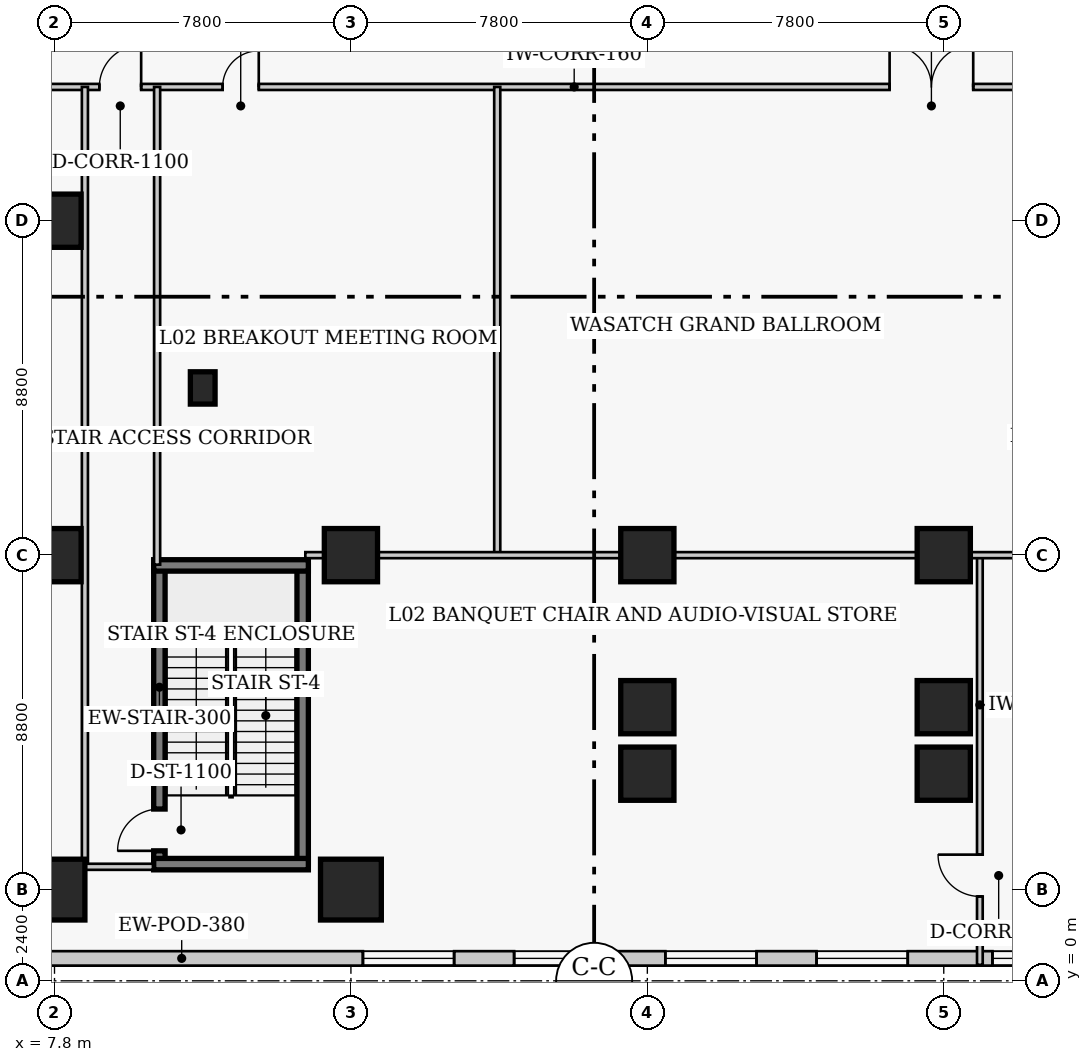
"""IFC4 building model, lengths in metres.
Left out: names, types, materials, properties, quantities, classifications, styles, units other than length and angle.
Written with IfcOpenShell. Run it as: python <this file> out.ifc"""

import sys

from ifc_helpers import new_model, si_unit, direction, frame, frame_2d, origin, origin_2d, place, context, subcontext, project, spatial, rectangle, extrude, element, fill, save


model = new_model("IFC4")
c1 = context("Model", 3, precision=1e-05, world=origin(), true_north=direction((0.0, 1.0)))
c2 = subcontext(c1, "Body", "Model", "MODEL_VIEW")
j1 = project(units=[si_unit("LENGTHUNIT", "METRE"), si_unit("PLANEANGLEUNIT", "RADIAN")], contexts=[c1])
p1 = place(None, origin())
s1 = spatial("IfcSite", under=j1, at=p1, CompositionType="ELEMENT")
p2 = place(p1, origin())
s2 = spatial("IfcBuilding", under=s1, at=p2, CompositionType="ELEMENT")
p3 = place(p2, frame((0.0, 0.0, 10.4)))
s3 = spatial("IfcBuildingStorey", under=s2, at=p3, CompositionType="ELEMENT", Elevation=10.4)
p4 = place(p3, frame((10.56, 3.07, 0.0), z_axis=(0.0, 0.0, 1.0), x_axis=(0.0, 1.0, 0.0)))
e1 = element("IfcWall", 1, at=p4, inside=s3, PredefinedType="SHEAR", context=c2, shape_type="SweptSolid", body=[
    extrude(rectangle(XDim=7.86, YDim=0.3, at=frame_2d((3.93, 0.0))), origin(), (0.0, 0.0, 1.0), 5.4),
])
p5 = place(p4, frame((0.35, 0.0, 0.0)))
e2 = element("IfcOpeningElement", 2, at=p5, cuts=e1, PredefinedType="OPENING", context=c2, shape_type="SweptSolid", body=[
    extrude(rectangle(XDim=1.1, YDim=2.15, at=frame_2d((0.55, 1.075))), frame((0.0, 0.16, 0.0), z_axis=(0.0, -1.0, 0.0), x_axis=(1.0, 0.0, 0.0)), (0.0, 0.0, 1.0), 0.32),
])
p6 = place(p3, frame((14.33, 3.07, 0.0), z_axis=(0.0, 0.0, 1.0), x_axis=(0.0, 1.0, 0.0)))
e3 = element("IfcWall", 3, at=p6, inside=s3, PredefinedType="SHEAR", context=c2, shape_type="SweptSolid", body=[
    extrude(rectangle(XDim=7.86, YDim=0.3, at=frame_2d((3.93, 0.0))), origin(), (0.0, 0.0, 1.0), 5.4),
])
for number, where, z_axis, x_axis in (
    (4, (10.41, 10.93, 0.0), (0.0, 0.0, 1.0), (1.0, 0.0, 0.0)),
    (5, (10.41, 3.07, 0.0), (0.0, 0.0, 1.0), (1.0, 0.0, 0.0)),
):
    element("IfcWall", number, at=place(p3, frame(where, z_axis=z_axis, x_axis=x_axis)), inside=s3, PredefinedType="SHEAR", context=c2, shape_type="SweptSolid", body=[
        extrude(rectangle(XDim=4.07, YDim=0.3, at=frame_2d((2.035, 0.0))), origin(), (0.0, 0.0, 1.0), 5.4),
    ])
p7 = place(p3, frame((7.8, 2.4, 0.0), z_axis=(0.0, 0.0, 1.0), x_axis=(1.0, 0.0, 0.0)))
e6 = element("IfcColumn", 6, at=p7, inside=s3, PredefinedType="COLUMN", context=c2, shape_type="SweptSolid", body=[
    extrude(rectangle(XDim=1.6, YDim=1.6, at=origin_2d()), origin(), (0.0, 0.0, 1.0), 5.4),
])
for number, where, z_axis, x_axis in (
    (7, (7.8, 11.2, 0.0), (0.0, 0.0, 1.0), (1.0, 0.0, 0.0)),
    (8, (7.8, 20.0, 0.0), (0.0, 0.0, 1.0), (1.0, 0.0, 0.0)),
):
    element("IfcColumn", number, at=place(p3, frame(where, z_axis=z_axis, x_axis=x_axis)), inside=s3, PredefinedType="COLUMN", context=c2, shape_type="SweptSolid", body=[
        extrude(rectangle(XDim=1.4, YDim=1.4, at=origin_2d()), origin(), (0.0, 0.0, 1.0), 5.4),
    ])
p8 = place(p3, frame((15.6, 2.4, 0.0), z_axis=(0.0, 0.0, 1.0), x_axis=(1.0, 0.0, 0.0)))
e9 = element("IfcColumn", 9, at=p8, inside=s3, PredefinedType="COLUMN", context=c2, shape_type="SweptSolid", body=[
    extrude(rectangle(XDim=1.6, YDim=1.6, at=origin_2d()), origin(), (0.0, 0.0, 1.0), 5.4),
])
for number, where, z_axis, x_axis in (
    (10, (15.6, 11.2, 0.0), (0.0, 0.0, 1.0), (1.0, 0.0, 0.0)),
    (11, (23.4, 11.2, 0.0), (0.0, 0.0, 1.0), (1.0, 0.0, 0.0)),
    (12, (31.2, 11.2, 0.0), (0.0, 0.0, 1.0), (1.0, 0.0, 0.0)),
    (13, (23.4, 7.2, 0.0), (0.0, 0.0, 1.0), (1.0, 0.0, 0.0)),
    (14, (31.2, 7.2, 0.0), (0.0, 0.0, 1.0), (1.0, 0.0, 0.0)),
    (15, (23.4, 5.45, 0.0), (0.0, 0.0, 1.0), (1.0, 0.0, 0.0)),
    (16, (31.2, 5.45, 0.0), (0.0, 0.0, 1.0), (1.0, 0.0, 0.0)),
):
    element("IfcColumn", number, at=place(p3, frame(where, z_axis=z_axis, x_axis=x_axis)), inside=s3, PredefinedType="COLUMN", context=c2, shape_type="SweptSolid", body=[
        extrude(rectangle(XDim=1.4, YDim=1.4, at=origin_2d()), origin(), (0.0, 0.0, 1.0), 5.4),
    ])
p9 = place(p3, frame((11.7, 15.6, 0.0), z_axis=(0.0, 0.0, 1.0), x_axis=(1.0, 0.0, 0.0)))
e17 = element("IfcColumn", 17, at=p9, inside=s3, PredefinedType="PILASTER", context=c2, shape_type="SweptSolid", body=[
    extrude(rectangle(XDim=0.65, YDim=0.85, at=origin_2d()), origin(), (0.0, 0.0, 1.0), 5.4),
])
p10 = place(p3, frame((-0.79, 0.59, 0.0), z_axis=(0.0, 0.0, 1.0), x_axis=(1.0, 0.0, 0.0)))
e18 = element("IfcWall", 18, at=p10, inside=s3, PredefinedType="SOLIDWALL", context=c2, shape_type="SweptSolid", body=[
    extrude(rectangle(XDim=79.58, YDim=0.38, at=frame_2d((39.79, 0.0))), origin(), (0.0, 0.0, 1.0), 5.1),
])
p11 = place(p10, frame((1.439, 0.0, 0.75)))
e19 = element("IfcOpeningElement", 19, at=p11, cuts=e18, PredefinedType="OPENING", context=c2, shape_type="SweptSolid", body=[
    extrude(rectangle(XDim=2.4, YDim=2.2, at=frame_2d((1.2, 1.1))), frame((0.0, 0.2, 0.0), z_axis=(0.0, -1.0, 0.0), x_axis=(1.0, 0.0, 0.0)), (0.0, 0.0, 1.0), 0.4),
])
p12 = place(p10, frame((4.769, 0.0, 0.75)))
e20 = element("IfcOpeningElement", 20, at=p12, cuts=e18, PredefinedType="OPENING", context=c2, shape_type="SweptSolid", body=[
    extrude(rectangle(XDim=2.4, YDim=2.2, at=frame_2d((1.2, 1.1))), frame((0.0, 0.2, 0.0), z_axis=(0.0, -1.0, 0.0), x_axis=(1.0, 0.0, 0.0)), (0.0, 0.0, 1.0), 0.4),
])
p13 = place(p10, frame((16.706, 0.0, 0.75)))
e21 = element("IfcOpeningElement", 21, at=p13, cuts=e18, PredefinedType="OPENING", context=c2, shape_type="SweptSolid", body=[
    extrude(rectangle(XDim=2.4, YDim=2.2, at=frame_2d((1.2, 1.1))), frame((0.0, 0.2, 0.0), z_axis=(0.0, -1.0, 0.0), x_axis=(1.0, 0.0, 0.0)), (0.0, 0.0, 1.0), 0.4),
])
p14 = place(p10, frame((20.685, 0.0, 0.75)))
e22 = element("IfcOpeningElement", 22, at=p14, cuts=e18, PredefinedType="OPENING", context=c2, shape_type="SweptSolid", body=[
    extrude(rectangle(XDim=2.4, YDim=2.2, at=frame_2d((1.2, 1.1))), frame((0.0, 0.2, 0.0), z_axis=(0.0, -1.0, 0.0), x_axis=(1.0, 0.0, 0.0)), (0.0, 0.0, 1.0), 0.4),
])
p15 = place(p10, frame((24.664, 0.0, 0.75)))
e23 = element("IfcOpeningElement", 23, at=p15, cuts=e18, PredefinedType="OPENING", context=c2, shape_type="SweptSolid", body=[
    extrude(rectangle(XDim=2.4, YDim=2.2, at=frame_2d((1.2, 1.1))), frame((0.0, 0.2, 0.0), z_axis=(0.0, -1.0, 0.0), x_axis=(1.0, 0.0, 0.0)), (0.0, 0.0, 1.0), 0.4),
])
p16 = place(p10, frame((28.643, 0.0, 0.75)))
e24 = element("IfcOpeningElement", 24, at=p16, cuts=e18, PredefinedType="OPENING", context=c2, shape_type="SweptSolid", body=[
    extrude(rectangle(XDim=2.4, YDim=2.2, at=frame_2d((1.2, 1.1))), frame((0.0, 0.2, 0.0), z_axis=(0.0, -1.0, 0.0), x_axis=(1.0, 0.0, 0.0)), (0.0, 0.0, 1.0), 0.4),
])
p17 = place(p10, frame((33.271, 0.0, 0.75)))
e25 = element("IfcOpeningElement", 25, at=p17, cuts=e18, PredefinedType="OPENING", context=c2, shape_type="SweptSolid", body=[
    extrude(rectangle(XDim=2.4, YDim=2.2, at=frame_2d((1.2, 1.1))), frame((0.0, 0.2, 0.0), z_axis=(0.0, -1.0, 0.0), x_axis=(1.0, 0.0, 0.0)), (0.0, 0.0, 1.0), 0.4),
])
p18 = place(p10, frame((37.75, 0.0, 0.75)))
e26 = element("IfcOpeningElement", 26, at=p18, cuts=e18, PredefinedType="OPENING", context=c2, shape_type="SweptSolid", body=[
    extrude(rectangle(XDim=2.4, YDim=2.2, at=frame_2d((1.2, 1.1))), frame((0.0, 0.2, 0.0), z_axis=(0.0, -1.0, 0.0), x_axis=(1.0, 0.0, 0.0)), (0.0, 0.0, 1.0), 0.4),
])
p19 = place(p10, frame((44.559, 0.0, 0.75)))
e27 = element("IfcOpeningElement", 27, at=p19, cuts=e18, PredefinedType="OPENING", context=c2, shape_type="SweptSolid", body=[
    extrude(rectangle(XDim=2.4, YDim=2.2, at=frame_2d((1.2, 1.1))), frame((0.0, 0.2, 0.0), z_axis=(0.0, -1.0, 0.0), x_axis=(1.0, 0.0, 0.0)), (0.0, 0.0, 1.0), 0.4),
])
p20 = place(p10, frame((48.538, 0.0, 0.75)))
e28 = element("IfcOpeningElement", 28, at=p20, cuts=e18, PredefinedType="OPENING", context=c2, shape_type="SweptSolid", body=[
    extrude(rectangle(XDim=2.4, YDim=2.2, at=frame_2d((1.2, 1.1))), frame((0.0, 0.2, 0.0), z_axis=(0.0, -1.0, 0.0), x_axis=(1.0, 0.0, 0.0)), (0.0, 0.0, 1.0), 0.4),
])
p21 = place(p10, frame((52.517, 0.0, 0.75)))
e29 = element("IfcOpeningElement", 29, at=p21, cuts=e18, PredefinedType="OPENING", context=c2, shape_type="SweptSolid", body=[
    extrude(rectangle(XDim=2.4, YDim=2.2, at=frame_2d((1.2, 1.1))), frame((0.0, 0.2, 0.0), z_axis=(0.0, -1.0, 0.0), x_axis=(1.0, 0.0, 0.0)), (0.0, 0.0, 1.0), 0.4),
])
p22 = place(p10, frame((56.496, 0.0, 0.75)))
e30 = element("IfcOpeningElement", 30, at=p22, cuts=e18, PredefinedType="OPENING", context=c2, shape_type="SweptSolid", body=[
    extrude(rectangle(XDim=2.4, YDim=2.2, at=frame_2d((1.2, 1.1))), frame((0.0, 0.2, 0.0), z_axis=(0.0, -1.0, 0.0), x_axis=(1.0, 0.0, 0.0)), (0.0, 0.0, 1.0), 0.4),
])
p23 = place(p10, frame((60.475, 0.0, 0.75)))
e31 = element("IfcOpeningElement", 31, at=p23, cuts=e18, PredefinedType="OPENING", context=c2, shape_type="SweptSolid", body=[
    extrude(rectangle(XDim=2.4, YDim=2.2, at=frame_2d((1.2, 1.1))), frame((0.0, 0.2, 0.0), z_axis=(0.0, -1.0, 0.0), x_axis=(1.0, 0.0, 0.0)), (0.0, 0.0, 1.0), 0.4),
])
p24 = place(p10, frame((64.454, 0.0, 0.75)))
e32 = element("IfcOpeningElement", 32, at=p24, cuts=e18, PredefinedType="OPENING", context=c2, shape_type="SweptSolid", body=[
    extrude(rectangle(XDim=2.4, YDim=2.2, at=frame_2d((1.2, 1.1))), frame((0.0, 0.2, 0.0), z_axis=(0.0, -1.0, 0.0), x_axis=(1.0, 0.0, 0.0)), (0.0, 0.0, 1.0), 0.4),
])
p25 = place(p10, frame((68.433, 0.0, 0.75)))
e33 = element("IfcOpeningElement", 33, at=p25, cuts=e18, PredefinedType="OPENING", context=c2, shape_type="SweptSolid", body=[
    extrude(rectangle(XDim=2.4, YDim=2.2, at=frame_2d((1.2, 1.1))), frame((0.0, 0.2, 0.0), z_axis=(0.0, -1.0, 0.0), x_axis=(1.0, 0.0, 0.0)), (0.0, 0.0, 1.0), 0.4),
])
p26 = place(p10, frame((72.412, 0.0, 0.75)))
e34 = element("IfcOpeningElement", 34, at=p26, cuts=e18, PredefinedType="OPENING", context=c2, shape_type="SweptSolid", body=[
    extrude(rectangle(XDim=2.4, YDim=2.2, at=frame_2d((1.2, 1.1))), frame((0.0, 0.2, 0.0), z_axis=(0.0, -1.0, 0.0), x_axis=(1.0, 0.0, 0.0)), (0.0, 0.0, 1.0), 0.4),
])
p27 = place(p10, frame((75.74, 0.0, 0.75)))
e35 = element("IfcOpeningElement", 35, at=p27, cuts=e18, PredefinedType="OPENING", context=c2, shape_type="SweptSolid", body=[
    extrude(rectangle(XDim=2.4, YDim=2.2, at=frame_2d((1.2, 1.1))), frame((0.0, 0.2, 0.0), z_axis=(0.0, -1.0, 0.0), x_axis=(1.0, 0.0, 0.0)), (0.0, 0.0, 1.0), 0.4),
])
p28 = place(p3, frame((-2.98, 23.52, 0.0), z_axis=(0.0, 0.0, 1.0), x_axis=(1.0, 0.0, 0.0)))
e36 = element("IfcWall", 36, at=p28, inside=s3, PredefinedType="PARTITIONING", context=c2, shape_type="SweptSolid", body=[
    extrude(rectangle(XDim=83.96, YDim=0.16, at=frame_2d((41.98, 0.0))), origin(), (0.0, 0.0, 1.0), 5.1),
])
p29 = place(p28, frame((7.13, 0.0, 0.0)))
e37 = element("IfcOpeningElement", 37, at=p29, cuts=e36, PredefinedType="OPENING", context=c2, shape_type="SweptSolid", body=[
    extrude(rectangle(XDim=1.0, YDim=2.15, at=frame_2d((0.5, 1.075))), frame((0.0, 0.09, 0.0), z_axis=(0.0, -1.0, 0.0), x_axis=(1.0, 0.0, 0.0)), (0.0, 0.0, 1.0), 0.18),
])
p30 = place(p28, frame((11.96, 0.0, 0.0)))
e38 = element("IfcOpeningElement", 38, at=p30, cuts=e36, PredefinedType="OPENING", context=c2, shape_type="SweptSolid", body=[
    extrude(rectangle(XDim=1.1, YDim=2.15, at=frame_2d((0.55, 1.075))), frame((0.0, 0.09, 0.0), z_axis=(0.0, -1.0, 0.0), x_axis=(1.0, 0.0, 0.0)), (0.0, 0.0, 1.0), 0.18),
])
p31 = place(p28, frame((45.93, 0.0, 0.0)))
e39 = element("IfcOpeningElement", 39, at=p31, cuts=e36, PredefinedType="OPENING", context=c2, shape_type="SweptSolid", body=[
    extrude(rectangle(XDim=1.1, YDim=2.15, at=frame_2d((0.55, 1.075))), frame((0.0, 0.09, 0.0), z_axis=(0.0, -1.0, 0.0), x_axis=(1.0, 0.0, 0.0)), (0.0, 0.0, 1.0), 0.18),
])
p32 = place(p28, frame((15.205, 0.0, 0.0)))
e40 = element("IfcOpeningElement", 40, at=p32, cuts=e36, PredefinedType="OPENING", context=c2, shape_type="SweptSolid", body=[
    extrude(rectangle(XDim=0.95, YDim=2.1, at=frame_2d((0.475, 1.05))), frame((0.0, 0.09, 0.0), z_axis=(0.0, -1.0, 0.0), x_axis=(1.0, 0.0, 0.0)), (0.0, 0.0, 1.0), 0.18),
])
p33 = place(p28, frame((32.755, 0.0, 0.0)))
e41 = element("IfcOpeningElement", 41, at=p33, cuts=e36, PredefinedType="OPENING", context=c2, shape_type="SweptSolid", body=[
    extrude(rectangle(XDim=2.2, YDim=2.4, at=frame_2d((1.1, 1.2))), frame((0.0, 0.09, 0.0), z_axis=(0.0, -1.0, 0.0), x_axis=(1.0, 0.0, 0.0)), (0.0, 0.0, 1.0), 0.18),
])
p34 = place(p28, frame((55.455, 0.0, 0.0)))
e42 = element("IfcOpeningElement", 42, at=p34, cuts=e36, PredefinedType="OPENING", context=c2, shape_type="SweptSolid", body=[
    extrude(rectangle(XDim=2.2, YDim=2.4, at=frame_2d((1.1, 1.2))), frame((0.0, 0.09, 0.0), z_axis=(0.0, -1.0, 0.0), x_axis=(1.0, 0.0, 0.0)), (0.0, 0.0, 1.0), 0.18),
])
p35 = place(p28, frame((67.34, 0.0, 0.0)))
e43 = element("IfcOpeningElement", 43, at=p35, cuts=e36, PredefinedType="OPENING", context=c2, shape_type="SweptSolid", body=[
    extrude(rectangle(XDim=0.88, YDim=2.05, at=frame_2d((0.44, 1.025))), frame((0.0, 0.09, 0.0), z_axis=(0.0, -1.0, 0.0), x_axis=(1.0, 0.0, 0.0)), (0.0, 0.0, 1.0), 0.18),
])
p36 = place(p28, frame((76.29, 0.0, 0.0)))
e44 = element("IfcOpeningElement", 44, at=p36, cuts=e36, PredefinedType="OPENING", context=c2, shape_type="SweptSolid", body=[
    extrude(rectangle(XDim=0.88, YDim=2.05, at=frame_2d((0.44, 1.025))), frame((0.0, 0.09, 0.0), z_axis=(0.0, -1.0, 0.0), x_axis=(1.0, 0.0, 0.0)), (0.0, 0.0, 1.0), 0.18),
])
p37 = place(p3, frame((8.6, 3.0, 0.0), z_axis=(0.0, 0.0, 1.0), x_axis=(0.0, 1.0, 0.0)))
e45 = element("IfcWall", 45, at=p37, inside=s3, PredefinedType="PARTITIONING", context=c2, shape_type="SweptSolid", body=[
    extrude(rectangle(XDim=20.52, YDim=0.16, at=frame_2d((10.26, 0.0))), origin(), (0.0, 0.0, 1.0), 5.1),
])
p38 = place(p3, frame((10.5, 10.95, 0.0), z_axis=(0.0, 0.0, 1.0), x_axis=(0.0, 1.0, 0.0)))
e46 = element("IfcWall", 46, at=p38, inside=s3, PredefinedType="PARTITIONING", context=c2, shape_type="SweptSolid", body=[
    extrude(rectangle(XDim=12.57, YDim=0.16, at=frame_2d((6.285, 0.0))), origin(), (0.0, 0.0, 1.0), 5.1),
])
p39 = place(p3, frame((8.6, 3.0, 0.0), z_axis=(0.0, 0.0, 1.0), x_axis=(1.0, 0.0, 0.0)))
e47 = element("IfcWall", 47, at=p39, inside=s3, PredefinedType="PARTITIONING", context=c2, shape_type="SweptSolid", body=[
    extrude(rectangle(XDim=1.79, YDim=0.16, at=frame_2d((0.895, 0.0))), origin(), (0.0, 0.0, 1.0), 5.1),
])
p40 = place(p3, frame((19.45, 11.2, 0.0), z_axis=(0.0, 0.0, 1.0), x_axis=(0.0, 1.0, 0.0)))
e48 = element("IfcWall", 48, at=p40, inside=s3, PredefinedType="PARTITIONING", context=c2, shape_type="SweptSolid", body=[
    extrude(rectangle(XDim=12.32, YDim=0.16, at=frame_2d((6.16, 0.0))), origin(), (0.0, 0.0, 1.0), 5.1),
])
p41 = place(p3, frame((32.15, 0.42, 0.0), z_axis=(0.0, 0.0, 1.0), x_axis=(0.0, 1.0, 0.0)))
e49 = element("IfcWall", 49, at=p41, inside=s3, PredefinedType="PARTITIONING", context=c2, shape_type="SweptSolid", body=[
    extrude(rectangle(XDim=10.78, YDim=0.15, at=frame_2d((5.39, 0.0))), origin(), (0.0, 0.0, 1.0), 5.1),
])
p42 = place(p41, frame((1.8, 0.0, 0.0)))
e50 = element("IfcOpeningElement", 50, at=p42, cuts=e49, PredefinedType="OPENING", context=c2, shape_type="SweptSolid", body=[
    extrude(rectangle(XDim=1.1, YDim=2.15, at=frame_2d((0.55, 1.075))), frame((0.0, 0.085, 0.0), z_axis=(0.0, -1.0, 0.0), x_axis=(1.0, 0.0, 0.0)), (0.0, 0.0, 1.0), 0.17),
])
p43 = place(p3, frame((14.4, 11.2, 0.0), z_axis=(0.0, 0.0, 1.0), x_axis=(1.0, 0.0, 0.0)))
e51 = element("IfcWall", 51, at=p43, inside=s3, PredefinedType="PARTITIONING", context=c2, shape_type="SweptSolid", body=[
    extrude(rectangle(XDim=48.0, YDim=0.16, at=frame_2d((24.0, 0.0))), origin(), (0.0, 0.0, 1.0), 4.06),
])
p44 = place(p43, frame((28.55, 0.0, 0.0)))
e52 = element("IfcOpeningElement", 52, at=p44, cuts=e51, PredefinedType="OPENING", context=c2, shape_type="SweptSolid", body=[
    extrude(rectangle(XDim=1.1, YDim=2.15, at=frame_2d((0.55, 1.075))), frame((0.0, 0.09, 0.0), z_axis=(0.0, -1.0, 0.0), x_axis=(1.0, 0.0, 0.0)), (0.0, 0.0, 1.0), 0.18),
])
p45 = place(p43, frame((19.0, 0.0, 0.0)))
e53 = element("IfcOpeningElement", 53, at=p45, cuts=e51, PredefinedType="OPENING", context=c2, shape_type="SweptSolid", body=[
    extrude(rectangle(XDim=2.2, YDim=2.4, at=frame_2d((1.1, 1.2))), frame((0.0, 0.09, 0.0), z_axis=(0.0, -1.0, 0.0), x_axis=(1.0, 0.0, 0.0)), (0.0, 0.0, 1.0), 0.18),
])
p46 = place(p43, frame((34.688, 0.0, 0.0)))
e54 = element("IfcOpeningElement", 54, at=p46, cuts=e51, PredefinedType="OPENING", context=c2, shape_type="SweptSolid", body=[
    extrude(rectangle(XDim=2.2, YDim=2.4, at=frame_2d((1.1, 1.2))), frame((0.0, 0.09, 0.0), z_axis=(0.0, -1.0, 0.0), x_axis=(1.0, 0.0, 0.0)), (0.0, 0.0, 1.0), 0.18),
])
p47 = place(p13, origin())
e55 = element("IfcWindow", 55, at=p47, inside=s3, PartitioningType="SINGLE_PANEL", PredefinedType="WINDOW", context=c2, shape_type="SweptSolid", body=[
    extrude(rectangle(XDim=2.4, YDim=2.2, at=frame_2d((1.2, 1.1))), frame((0.0, 0.03, 0.0), z_axis=(0.0, -1.0, 0.0), x_axis=(1.0, 0.0, 0.0)), (0.0, 0.0, 1.0), 0.06),
])
fill(e21, e55)
p48 = place(p14, origin())
e56 = element("IfcWindow", 56, at=p48, inside=s3, PartitioningType="SINGLE_PANEL", PredefinedType="WINDOW", context=c2, shape_type="SweptSolid", body=[
    extrude(rectangle(XDim=2.4, YDim=2.2, at=frame_2d((1.2, 1.1))), frame((0.0, 0.03, 0.0), z_axis=(0.0, -1.0, 0.0), x_axis=(1.0, 0.0, 0.0)), (0.0, 0.0, 1.0), 0.06),
])
fill(e22, e56)
p49 = place(p15, origin())
e57 = element("IfcWindow", 57, at=p49, inside=s3, PartitioningType="SINGLE_PANEL", PredefinedType="WINDOW", context=c2, shape_type="SweptSolid", body=[
    extrude(rectangle(XDim=2.4, YDim=2.2, at=frame_2d((1.2, 1.1))), frame((0.0, 0.03, 0.0), z_axis=(0.0, -1.0, 0.0), x_axis=(1.0, 0.0, 0.0)), (0.0, 0.0, 1.0), 0.06),
])
fill(e23, e57)
p50 = place(p16, origin())
e58 = element("IfcWindow", 58, at=p50, inside=s3, PartitioningType="SINGLE_PANEL", PredefinedType="WINDOW", context=c2, shape_type="SweptSolid", body=[
    extrude(rectangle(XDim=2.4, YDim=2.2, at=frame_2d((1.2, 1.1))), frame((0.0, 0.03, 0.0), z_axis=(0.0, -1.0, 0.0), x_axis=(1.0, 0.0, 0.0)), (0.0, 0.0, 1.0), 0.06),
])
fill(e24, e58)
p51 = place(p17, origin())
e59 = element("IfcWindow", 59, at=p51, inside=s3, PartitioningType="SINGLE_PANEL", PredefinedType="WINDOW", context=c2, shape_type="SweptSolid", body=[
    extrude(rectangle(XDim=2.4, YDim=2.2, at=frame_2d((1.2, 1.1))), frame((0.0, 0.03, 0.0), z_axis=(0.0, -1.0, 0.0), x_axis=(1.0, 0.0, 0.0)), (0.0, 0.0, 1.0), 0.06),
])
fill(e25, e59)
p52 = place(p30, origin())
e60 = element("IfcDoor", 60, at=p52, inside=s3, OperationType="SINGLE_SWING_RIGHT", PredefinedType="DOOR", context=c2, shape_type="SweptSolid", body=[
    extrude(rectangle(XDim=1.1, YDim=2.15, at=frame_2d((0.55, 1.075))), frame((0.0, 0.025, 0.0), z_axis=(0.0, -1.0, 0.0), x_axis=(1.0, 0.0, 0.0)), (0.0, 0.0, 1.0), 0.05),
])
fill(e38, e60)
p53 = place(p42, origin())
e61 = element("IfcDoor", 61, at=p53, inside=s3, OperationType="SINGLE_SWING_RIGHT", PredefinedType="DOOR", context=c2, shape_type="SweptSolid", body=[
    extrude(rectangle(XDim=1.1, YDim=2.15, at=frame_2d((0.55, 1.075))), frame((0.0, 0.025, 0.0), z_axis=(0.0, -1.0, 0.0), x_axis=(1.0, 0.0, 0.0)), (0.0, 0.0, 1.0), 0.05),
])
fill(e50, e61)
p54 = place(p32, origin())
e62 = element("IfcDoor", 62, at=p54, inside=s3, OperationType="SINGLE_SWING_RIGHT", PredefinedType="DOOR", context=c2, shape_type="SweptSolid", body=[
    extrude(rectangle(XDim=0.95, YDim=2.1, at=frame_2d((0.475, 1.05))), frame((0.0, 0.025, 0.0), z_axis=(0.0, -1.0, 0.0), x_axis=(1.0, 0.0, 0.0)), (0.0, 0.0, 1.0), 0.05),
])
fill(e40, e62)
p55 = place(p33, origin())
e63 = element("IfcDoor", 63, at=p55, inside=s3, OperationType="DOUBLE_DOOR_SINGLE_SWING", PredefinedType="DOOR", context=c2, shape_type="SweptSolid", body=[
    extrude(rectangle(XDim=2.2, YDim=2.4, at=frame_2d((1.1, 1.2))), frame((0.0, 0.025, 0.0), z_axis=(0.0, -1.0, 0.0), x_axis=(1.0, 0.0, 0.0)), (0.0, 0.0, 1.0), 0.05),
])
fill(e41, e63)
p56 = place(p5, origin())
e64 = element("IfcDoor", 64, at=p56, inside=s3, OperationType="SINGLE_SWING_LEFT", PredefinedType="DOOR", context=c2, shape_type="SweptSolid", body=[
    extrude(rectangle(XDim=1.1, YDim=2.15, at=frame_2d((0.55, 1.075))), frame((0.0, 0.025, 0.0), z_axis=(0.0, -1.0, 0.0), x_axis=(1.0, 0.0, 0.0)), (0.0, 0.0, 1.0), 0.05),
])
fill(e2, e64)
save(model, sys.argv[1])
